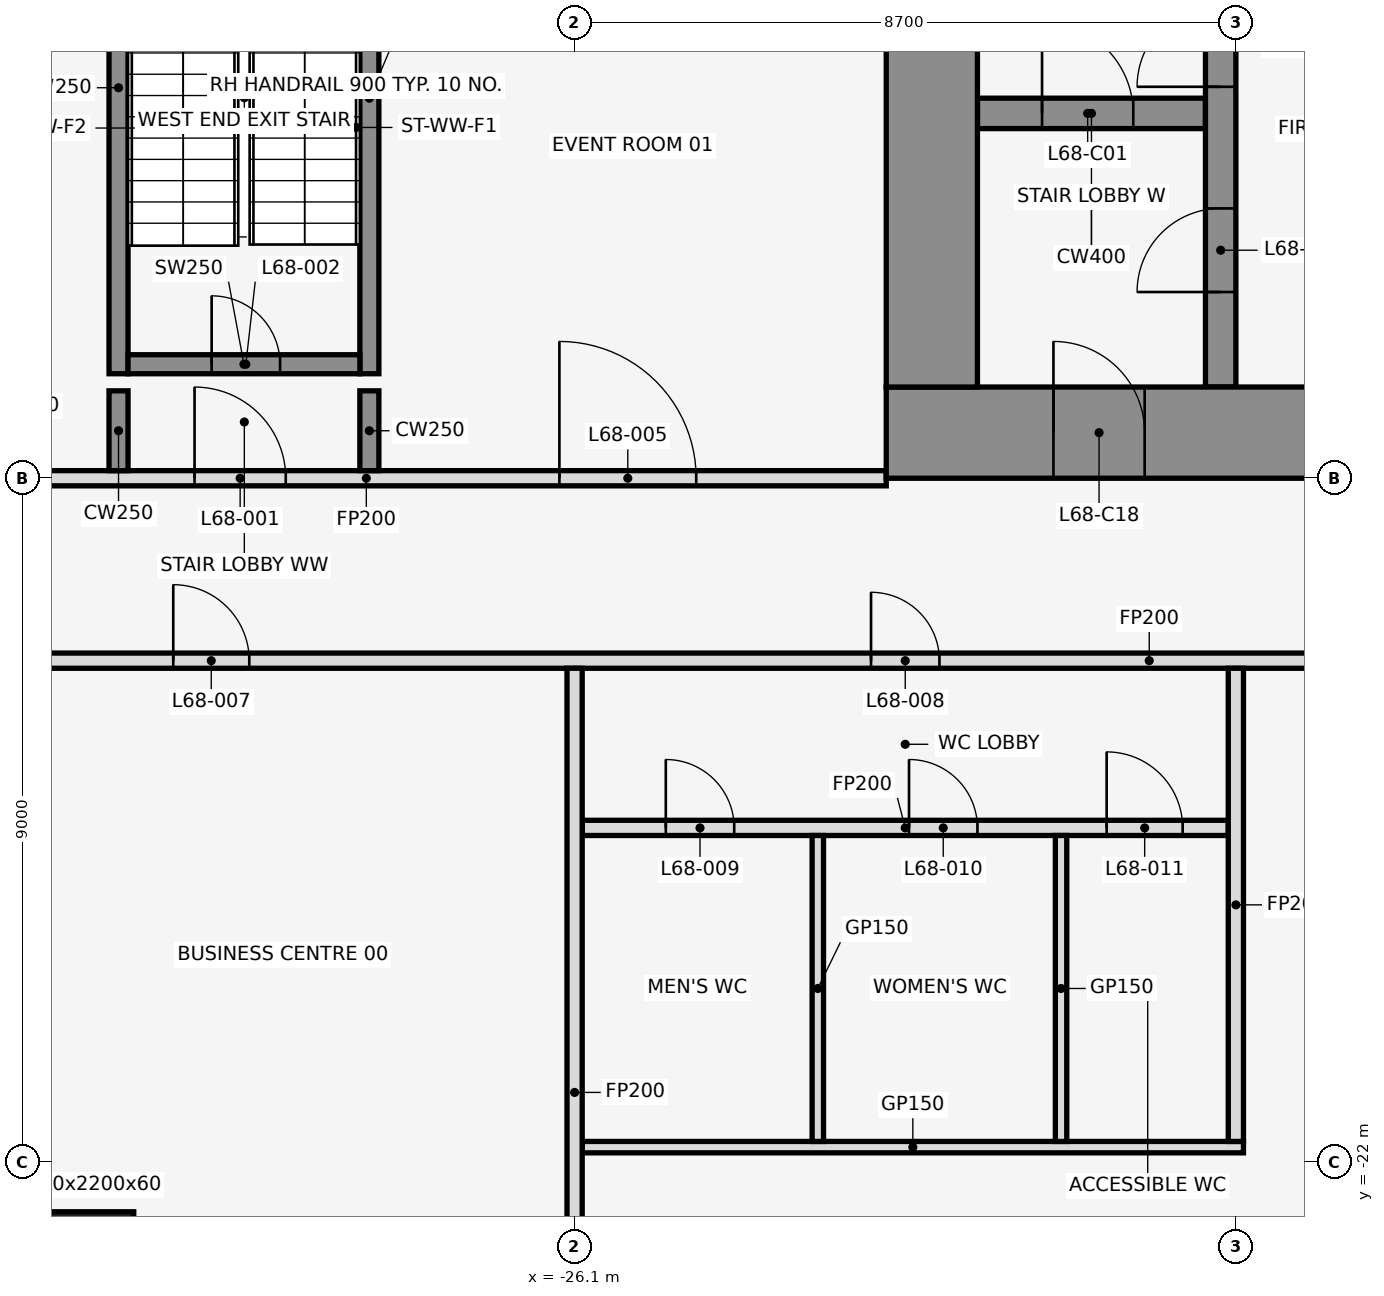
"""IFC4 building model, lengths in metres.
Left out: names, types, materials, properties, quantities, classifications, styles, units other than length and angle.
Written with IfcOpenShell. Run it as: python <this file> out.ifc"""

import sys

from ifc_helpers import new_model, si_unit, direction, frame, frame_2d, origin, origin_2d, place, context, subcontext, project, spatial, rectangle, hollow_rectangle, extrude, element, fill, save


model = new_model("IFC4")
c1 = context("Model", 3, precision=1e-05, world=origin(), true_north=direction((0.0, 1.0)))
c2 = subcontext(c1, "Body", "Model", "MODEL_VIEW")
j1 = project(units=[si_unit("LENGTHUNIT", "METRE"), si_unit("PLANEANGLEUNIT", "RADIAN")], contexts=[c1])
p1 = place(None, origin())
s1 = spatial("IfcSite", under=j1, at=p1, CompositionType="ELEMENT")
p2 = place(p1, origin())
s2 = spatial("IfcBuilding", under=s1, at=p2, CompositionType="ELEMENT")
p3 = place(p2, frame((0.0, 0.0, 302.0)))
s3 = spatial("IfcBuildingStorey", under=s2, at=p3, CompositionType="ELEMENT", Elevation=302.0)
p4 = place(p3, frame((-33.0, -23.75, 0.0), z_axis=(0.0, 0.0, 1.0), x_axis=(1.0, 0.0, 0.0)))
e1 = element("IfcColumn", 1, at=p4, inside=s3, PredefinedType="COLUMN", context=c2, shape_type="SweptSolid", body=[
    extrude(hollow_rectangle(XDim=2.2, YDim=2.2, WallThickness=0.06, at=origin_2d()), origin(), (0.0, 0.0, 1.0), 4.5),
])
p5 = place(p3, frame((-32.1, -11.625, 0.0), z_axis=(0.0, 0.0, 1.0), x_axis=(0.0, 1.0, 0.0)))
e2 = element("IfcWall", 2, at=p5, inside=s3, PredefinedType="SHEAR", context=c2, shape_type="SweptSolid", body=[
    extrude(rectangle(XDim=7.525, YDim=0.25, at=frame_2d((3.762, 0.0))), origin(), (0.0, 0.0, 1.0), 4.5),
])
p6 = place(p3, frame((-28.8, -11.625, 0.0), z_axis=(0.0, 0.0, 1.0), x_axis=(0.0, 1.0, 0.0)))
e3 = element("IfcWall", 3, at=p6, inside=s3, PredefinedType="SHEAR", context=c2, shape_type="SweptSolid", body=[
    extrude(rectangle(XDim=7.25, YDim=0.25, at=frame_2d((3.625, 0.0))), origin(), (0.0, 0.0, 1.0), 4.5),
])
p7 = place(p3, frame((-31.975, -11.5, 0.0), z_axis=(0.0, 0.0, 1.0), x_axis=(1.0, 0.0, 0.0)))
e4 = element("IfcWall", 4, at=p7, inside=s3, PredefinedType="SHEAR", context=c2, shape_type="SweptSolid", body=[
    extrude(rectangle(XDim=3.05, YDim=0.25, at=frame_2d((1.525, 0.0))), origin(), (0.0, 0.0, 1.0), 4.5),
])
p8 = place(p7, frame((1.1, 0.0, 0.0)))
e5 = element("IfcOpeningElement", 5, at=p8, cuts=e4, PredefinedType="OPENING", context=c2, shape_type="SweptSolid", body=[
    extrude(rectangle(XDim=0.9, YDim=2.1, at=frame_2d((0.45, 1.05))), frame((0.0, 0.137, 0.0), z_axis=(0.0, -1.0, 0.0), x_axis=(1.0, 0.0, 0.0)), (0.0, 0.0, 1.0), 0.274),
])
p9 = place(p3, frame((-26.0, -21.8, 0.0), z_axis=(0.0, 0.0, 1.0), x_axis=(1.0, 0.0, 0.0)))
e6 = element("IfcWall", 6, at=p9, inside=s3, PredefinedType="PARTITIONING", context=c2, shape_type="SweptSolid", body=[
    extrude(rectangle(XDim=8.7, YDim=0.15, at=frame_2d((4.35, 0.0))), origin(), (0.0, 0.0, 1.0), 3.418),
])
p10 = place(p3, frame((-26.0, -17.6, 0.0), z_axis=(0.0, 0.0, 1.0), x_axis=(1.0, 0.0, 0.0)))
e7 = element("IfcWall", 7, at=p10, inside=s3, PredefinedType="PARTITIONING", context=c2, shape_type="SweptSolid", body=[
    extrude(rectangle(XDim=8.5, YDim=0.2, at=frame_2d((4.25, 0.0))), origin(), (0.0, 0.0, 1.0), 3.418),
])
p11 = place(p10, frame((1.1, 0.0, 0.0)))
e8 = element("IfcOpeningElement", 8, at=p11, cuts=e7, PredefinedType="OPENING", context=c2, shape_type="SweptSolid", body=[
    extrude(rectangle(XDim=0.9, YDim=2.1, at=frame_2d((0.45, 1.05))), frame((0.0, 0.112, 0.0), z_axis=(0.0, -1.0, 0.0), x_axis=(1.0, 0.0, 0.0)), (0.0, 0.0, 1.0), 0.224),
])
p12 = place(p10, frame((4.3, 0.0, 0.0)))
e9 = element("IfcOpeningElement", 9, at=p12, cuts=e7, PredefinedType="OPENING", context=c2, shape_type="SweptSolid", body=[
    extrude(rectangle(XDim=0.9, YDim=2.1, at=frame_2d((0.45, 1.05))), frame((0.0, 0.112, 0.0), z_axis=(0.0, -1.0, 0.0), x_axis=(1.0, 0.0, 0.0)), (0.0, 0.0, 1.0), 0.224),
])
p13 = place(p10, frame((6.9, 0.0, 0.0)))
e10 = element("IfcOpeningElement", 10, at=p13, cuts=e7, PredefinedType="OPENING", context=c2, shape_type="SweptSolid", body=[
    extrude(rectangle(XDim=1.0, YDim=2.1, at=frame_2d((0.5, 1.05))), frame((0.0, 0.112, 0.0), z_axis=(0.0, -1.0, 0.0), x_axis=(1.0, 0.0, 0.0)), (0.0, 0.0, 1.0), 0.224),
])
p14 = place(p3, frame((-35.68, -15.4, 0.0), z_axis=(0.0, 0.0, 1.0), x_axis=(1.0, 0.0, 0.0)))
e11 = element("IfcWall", 11, at=p14, inside=s3, PredefinedType="PARTITIONING", context=c2, shape_type="SweptSolid", body=[
    extrude(rectangle(XDim=34.28, YDim=0.2, at=frame_2d((17.14, 0.0))), origin(), (0.0, 0.0, 1.0), 3.418),
])
p15 = place(p14, frame((4.3, 0.0, 0.0)))
e12 = element("IfcOpeningElement", 12, at=p15, cuts=e11, PredefinedType="OPENING", context=c2, shape_type="SweptSolid", body=[
    extrude(rectangle(XDim=1.0, YDim=2.1, at=frame_2d((0.5, 1.05))), frame((0.0, 0.112, 0.0), z_axis=(0.0, -1.0, 0.0), x_axis=(1.0, 0.0, 0.0)), (0.0, 0.0, 1.0), 0.224),
])
p16 = place(p14, frame((13.48, 0.0, 0.0)))
e13 = element("IfcOpeningElement", 13, at=p16, cuts=e11, PredefinedType="OPENING", context=c2, shape_type="SweptSolid", body=[
    extrude(rectangle(XDim=0.9, YDim=2.1, at=frame_2d((0.45, 1.05))), frame((0.0, 0.112, 0.0), z_axis=(0.0, -1.0, 0.0), x_axis=(1.0, 0.0, 0.0)), (0.0, 0.0, 1.0), 0.224),
])
p17 = place(p14, frame((21.68, 0.0, 0.0)))
e14 = element("IfcOpeningElement", 14, at=p17, cuts=e11, PredefinedType="OPENING", context=c2, shape_type="SweptSolid", body=[
    extrude(rectangle(XDim=1.8, YDim=2.1, at=frame_2d((0.9, 1.05))), frame((0.0, 0.112, 0.0), z_axis=(0.0, -1.0, 0.0), x_axis=(1.0, 0.0, 0.0)), (0.0, 0.0, 1.0), 0.224),
])
p18 = place(p3, frame((-35.68, -13.0, 0.0), z_axis=(0.0, 0.0, 1.0), x_axis=(1.0, 0.0, 0.0)))
e15 = element("IfcWall", 15, at=p18, inside=s3, PredefinedType="PARTITIONING", context=c2, shape_type="SweptSolid", body=[
    extrude(rectangle(XDim=13.68, YDim=0.2, at=frame_2d((6.84, 0.0))), origin(), (0.0, 0.0, 1.0), 3.418),
])
p19 = place(p18, frame((4.58, 0.0, 0.0)))
e16 = element("IfcOpeningElement", 16, at=p19, cuts=e15, PredefinedType="OPENING", context=c2, shape_type="SweptSolid", body=[
    extrude(rectangle(XDim=1.2, YDim=2.1, at=frame_2d((0.6, 1.05))), frame((0.0, 0.112, 0.0), z_axis=(0.0, -1.0, 0.0), x_axis=(1.0, 0.0, 0.0)), (0.0, 0.0, 1.0), 0.224),
])
p20 = place(p18, frame((9.38, 0.0, 0.0)))
e17 = element("IfcOpeningElement", 17, at=p20, cuts=e15, PredefinedType="OPENING", context=c2, shape_type="SweptSolid", body=[
    extrude(rectangle(XDim=1.8, YDim=2.1, at=frame_2d((0.9, 1.05))), frame((0.0, 0.112, 0.0), z_axis=(0.0, -1.0, 0.0), x_axis=(1.0, 0.0, 0.0)), (0.0, 0.0, 1.0), 0.224),
])
for number, where, z_axis, x_axis in (
    (18, (-32.1, -12.9, 0.0), (0.0, 0.0, 1.0), (0.0, 1.0, 0.0)),
    (19, (-28.8, -12.9, 0.0), (0.0, 0.0, 1.0), (0.0, 1.0, 0.0)),
):
    element("IfcWall", number, at=place(p3, frame(where, z_axis=z_axis, x_axis=x_axis)), inside=s3, PredefinedType="SHEAR", context=c2, shape_type="SweptSolid", body=[
        extrude(rectangle(XDim=1.05, YDim=0.25, at=frame_2d((0.525, 0.0))), origin(), (0.0, 0.0, 1.0), 4.5),
    ])
p21 = place(p3, frame((-26.1, -26.66, 0.0), z_axis=(0.0, 0.0, 1.0), x_axis=(0.0, 1.0, 0.0)))
e20 = element("IfcWall", 20, at=p21, inside=s3, PredefinedType="PARTITIONING", context=c2, shape_type="SweptSolid", body=[
    extrude(rectangle(XDim=11.16, YDim=0.2, at=frame_2d((5.58, 0.0))), origin(), (0.0, 0.0, 1.0), 3.418),
])
for number, where, z_axis, x_axis in (
    (21, (-22.9, -21.725, 0.0), (0.0, 0.0, 1.0), (0.0, 1.0, 0.0)),
    (22, (-19.7, -21.725, 0.0), (0.0, 0.0, 1.0), (0.0, 1.0, 0.0)),
):
    element("IfcWall", number, at=place(p3, frame(where, z_axis=z_axis, x_axis=x_axis)), inside=s3, PredefinedType="PARTITIONING", context=c2, shape_type="SweptSolid", body=[
        extrude(rectangle(XDim=4.025, YDim=0.15, at=frame_2d((2.013, 0.0))), origin(), (0.0, 0.0, 1.0), 3.418),
    ])
p22 = place(p3, frame((-17.4, -21.725, 0.0), z_axis=(0.0, 0.0, 1.0), x_axis=(0.0, 1.0, 0.0)))
e23 = element("IfcWall", 23, at=p22, inside=s3, PredefinedType="PARTITIONING", context=c2, shape_type="SweptSolid", body=[
    extrude(rectangle(XDim=6.225, YDim=0.2, at=frame_2d((3.113, 0.0))), origin(), (0.0, 0.0, 1.0), 3.418),
])
p23 = place(p3, frame((-20.8, -8.2, 0.0), z_axis=(0.0, 0.0, 1.0), x_axis=(1.0, 0.0, 0.0)))
e24 = element("IfcWall", 24, at=p23, inside=s3, PredefinedType="SHEAR", context=c2, shape_type="SweptSolid", body=[
    extrude(rectangle(XDim=3.0, YDim=0.4, at=frame_2d((1.5, 0.0))), origin(), (0.0, 0.0, 1.0), 4.5),
])
p24 = place(p23, frame((0.85, 0.0, 0.0)))
e25 = element("IfcOpeningElement", 25, at=p24, cuts=e24, PredefinedType="OPENING", context=c2, shape_type="SweptSolid", body=[
    extrude(rectangle(XDim=1.2, YDim=2.1, at=frame_2d((0.6, 1.05))), frame((0.0, 0.212, 0.0), z_axis=(0.0, -1.0, 0.0), x_axis=(1.0, 0.0, 0.0)), (0.0, 0.0, 1.0), 0.424),
])
p25 = place(p3, frame((-17.6, -11.8, 0.0), z_axis=(0.0, 0.0, 1.0), x_axis=(0.0, 1.0, 0.0)))
e26 = element("IfcWall", 26, at=p25, inside=s3, PredefinedType="SHEAR", context=c2, shape_type="SweptSolid", body=[
    extrude(rectangle(XDim=10.6, YDim=0.4, at=frame_2d((5.3, 0.0))), origin(), (0.0, 0.0, 1.0), 4.5),
])
p26 = place(p25, frame((1.25, 0.0, 0.0)))
e27 = element("IfcOpeningElement", 27, at=p26, cuts=e26, PredefinedType="OPENING", context=c2, shape_type="SweptSolid", body=[
    extrude(rectangle(XDim=1.1, YDim=2.1, at=frame_2d((0.55, 1.05))), frame((0.0, 0.212, 0.0), z_axis=(0.0, -1.0, 0.0), x_axis=(1.0, 0.0, 0.0)), (0.0, 0.0, 1.0), 0.424),
])
p27 = place(p25, frame((3.95, 0.0, 0.0)))
e28 = element("IfcOpeningElement", 28, at=p27, cuts=e26, PredefinedType="OPENING", context=c2, shape_type="SweptSolid", body=[
    extrude(rectangle(XDim=1.1, YDim=2.1, at=frame_2d((0.55, 1.05))), frame((0.0, 0.212, 0.0), z_axis=(0.0, -1.0, 0.0), x_axis=(1.0, 0.0, 0.0)), (0.0, 0.0, 1.0), 0.424),
])
p28 = place(p3, frame((-22.0, -12.4, 0.0), z_axis=(0.0, 0.0, 1.0), x_axis=(1.0, 0.0, 0.0)))
e29 = element("IfcWall", 29, at=p28, inside=s3, PredefinedType="SHEAR", context=c2, shape_type="SweptSolid", body=[
    extrude(rectangle(XDim=44.0, YDim=1.2, at=frame_2d((22.0, 0.0))), origin(), (0.0, 0.0, 1.0), 4.5),
])
p29 = place(p28, frame((2.2, 0.0, 0.0)))
e30 = element("IfcOpeningElement", 30, at=p29, cuts=e29, PredefinedType="OPENING", context=c2, shape_type="SweptSolid", body=[
    extrude(rectangle(XDim=1.2, YDim=2.1, at=frame_2d((0.6, 1.05))), frame((0.0, 0.612, 0.0), z_axis=(0.0, -1.0, 0.0), x_axis=(1.0, 0.0, 0.0)), (0.0, 0.0, 1.0), 1.224),
])
p30 = place(p28, frame((21.4, 0.0, 0.0)))
e31 = element("IfcOpeningElement", 31, at=p30, cuts=e29, PredefinedType="OPENING", context=c2, shape_type="SweptSolid", body=[
    extrude(rectangle(XDim=1.2, YDim=2.1, at=frame_2d((0.6, 1.05))), frame((0.0, 0.612, 0.0), z_axis=(0.0, -1.0, 0.0), x_axis=(1.0, 0.0, 0.0)), (0.0, 0.0, 1.0), 1.224),
])
p31 = place(p28, frame((40.6, 0.0, 0.0)))
e32 = element("IfcOpeningElement", 32, at=p31, cuts=e29, PredefinedType="OPENING", context=c2, shape_type="SweptSolid", body=[
    extrude(rectangle(XDim=1.2, YDim=2.1, at=frame_2d((0.6, 1.05))), frame((0.0, 0.612, 0.0), z_axis=(0.0, -1.0, 0.0), x_axis=(1.0, 0.0, 0.0)), (0.0, 0.0, 1.0), 1.224),
])
p32 = place(p28, frame((16.0, 0.0, 0.0)))
e33 = element("IfcOpeningElement", 33, at=p32, cuts=e29, PredefinedType="OPENING", context=c2, shape_type="SweptSolid", body=[
    extrude(rectangle(XDim=1.8, YDim=2.1, at=frame_2d((0.9, 1.05))), frame((0.0, 0.612, 0.0), z_axis=(0.0, -1.0, 0.0), x_axis=(1.0, 0.0, 0.0)), (0.0, 0.0, 1.0), 1.224),
])
p33 = place(p28, frame((6.3, 0.0, 0.0)))
e34 = element("IfcOpeningElement", 34, at=p33, cuts=e29, PredefinedType="OPENING", context=c2, shape_type="SweptSolid", body=[
    extrude(rectangle(XDim=1.2, YDim=2.1, at=frame_2d((0.6, 1.05))), frame((0.0, 0.612, 0.0), z_axis=(0.0, -1.0, 0.0), x_axis=(1.0, 0.0, 0.0)), (0.0, 0.0, 1.0), 1.224),
])
p34 = place(p28, frame((26.2, 0.0, 0.0)))
e35 = element("IfcOpeningElement", 35, at=p34, cuts=e29, PredefinedType="OPENING", context=c2, shape_type="SweptSolid", body=[
    extrude(rectangle(XDim=1.8, YDim=2.1, at=frame_2d((0.9, 1.05))), frame((0.0, 0.612, 0.0), z_axis=(0.0, -1.0, 0.0), x_axis=(1.0, 0.0, 0.0)), (0.0, 0.0, 1.0), 1.224),
])
p35 = place(p28, frame((36.5, 0.0, 0.0)))
e36 = element("IfcOpeningElement", 36, at=p35, cuts=e29, PredefinedType="OPENING", context=c2, shape_type="SweptSolid", body=[
    extrude(rectangle(XDim=1.2, YDim=2.1, at=frame_2d((0.6, 1.05))), frame((0.0, 0.612, 0.0), z_axis=(0.0, -1.0, 0.0), x_axis=(1.0, 0.0, 0.0)), (0.0, 0.0, 1.0), 1.224),
])
p36 = place(p3, frame((-21.4, -11.8, 0.0), z_axis=(0.0, 0.0, 1.0), x_axis=(0.0, 1.0, 0.0)))
e37 = element("IfcWall", 37, at=p36, inside=s3, PredefinedType="SHEAR", context=c2, shape_type="SweptSolid", body=[
    extrude(rectangle(XDim=10.6, YDim=1.2, at=frame_2d((5.3, 0.0))), origin(), (0.0, 0.0, 1.0), 4.5),
])
p37 = place(p19, origin())
e38 = element("IfcDoor", 38, at=p37, inside=s3, OperationType="SINGLE_SWING_LEFT", PredefinedType="DOOR", context=c2, shape_type="SweptSolid", body=[
    extrude(rectangle(XDim=1.2, YDim=2.1, at=frame_2d((0.6, 1.05))), frame((0.0, 0.025, 0.0), z_axis=(0.0, -1.0, 0.0), x_axis=(1.0, 0.0, 0.0)), (0.0, 0.0, 1.0), 0.05),
])
fill(e16, e38)
p38 = place(p8, origin())
e39 = element("IfcDoor", 39, at=p38, inside=s3, OperationType="SINGLE_SWING_LEFT", PredefinedType="DOOR", context=c2, shape_type="SweptSolid", body=[
    extrude(rectangle(XDim=0.9, YDim=2.1, at=frame_2d((0.45, 1.05))), frame((0.0, 0.025, 0.0), z_axis=(0.0, -1.0, 0.0), x_axis=(1.0, 0.0, 0.0)), (0.0, 0.0, 1.0), 0.05),
])
fill(e5, e39)
p39 = place(p20, origin())
e40 = element("IfcDoor", 40, at=p39, inside=s3, OperationType="SINGLE_SWING_LEFT", PredefinedType="DOOR", context=c2, shape_type="SweptSolid", body=[
    extrude(rectangle(XDim=1.8, YDim=2.1, at=frame_2d((0.9, 1.05))), frame((0.0, 0.025, 0.0), z_axis=(0.0, -1.0, 0.0), x_axis=(1.0, 0.0, 0.0)), (0.0, 0.0, 1.0), 0.05),
])
fill(e17, e40)
p40 = place(p15, frame((1.0, 0.0, 0.0), z_axis=(0.0, 0.0, 1.0), x_axis=(-1.0, 0.0, 0.0)))
e41 = element("IfcDoor", 41, at=p40, inside=s3, OperationType="SINGLE_SWING_LEFT", PredefinedType="DOOR", context=c2, shape_type="SweptSolid", body=[
    extrude(rectangle(XDim=1.0, YDim=2.1, at=frame_2d((0.5, 1.05))), frame((0.0, 0.025, 0.0), z_axis=(0.0, -1.0, 0.0), x_axis=(1.0, 0.0, 0.0)), (0.0, 0.0, 1.0), 0.05),
])
fill(e12, e41)
p41 = place(p16, frame((0.9, 0.0, 0.0), z_axis=(0.0, 0.0, 1.0), x_axis=(-1.0, 0.0, 0.0)))
e42 = element("IfcDoor", 42, at=p41, inside=s3, OperationType="SINGLE_SWING_RIGHT", PredefinedType="DOOR", context=c2, shape_type="SweptSolid", body=[
    extrude(rectangle(XDim=0.9, YDim=2.1, at=frame_2d((0.45, 1.05))), frame((0.0, 0.025, 0.0), z_axis=(0.0, -1.0, 0.0), x_axis=(1.0, 0.0, 0.0)), (0.0, 0.0, 1.0), 0.05),
])
fill(e13, e42)
p42 = place(p11, frame((0.9, 0.0, 0.0), z_axis=(0.0, 0.0, 1.0), x_axis=(-1.0, 0.0, 0.0)))
e43 = element("IfcDoor", 43, at=p42, inside=s3, OperationType="SINGLE_SWING_RIGHT", PredefinedType="DOOR", context=c2, shape_type="SweptSolid", body=[
    extrude(rectangle(XDim=0.9, YDim=2.1, at=frame_2d((0.45, 1.05))), frame((0.0, 0.025, 0.0), z_axis=(0.0, -1.0, 0.0), x_axis=(1.0, 0.0, 0.0)), (0.0, 0.0, 1.0), 0.05),
])
fill(e8, e43)
p43 = place(p12, frame((0.9, 0.0, 0.0), z_axis=(0.0, 0.0, 1.0), x_axis=(-1.0, 0.0, 0.0)))
e44 = element("IfcDoor", 44, at=p43, inside=s3, OperationType="SINGLE_SWING_LEFT", PredefinedType="DOOR", context=c2, shape_type="SweptSolid", body=[
    extrude(rectangle(XDim=0.9, YDim=2.1, at=frame_2d((0.45, 1.05))), frame((0.0, 0.025, 0.0), z_axis=(0.0, -1.0, 0.0), x_axis=(1.0, 0.0, 0.0)), (0.0, 0.0, 1.0), 0.05),
])
fill(e9, e44)
p44 = place(p13, frame((1.0, 0.0, 0.0), z_axis=(0.0, 0.0, 1.0), x_axis=(-1.0, 0.0, 0.0)))
e45 = element("IfcDoor", 45, at=p44, inside=s3, OperationType="SINGLE_SWING_RIGHT", PredefinedType="DOOR", context=c2, shape_type="SweptSolid", body=[
    extrude(rectangle(XDim=1.0, YDim=2.1, at=frame_2d((0.5, 1.05))), frame((0.0, 0.025, 0.0), z_axis=(0.0, -1.0, 0.0), x_axis=(1.0, 0.0, 0.0)), (0.0, 0.0, 1.0), 0.05),
])
fill(e10, e45)
p45 = place(p24, origin())
e46 = element("IfcDoor", 46, at=p45, inside=s3, OperationType="SINGLE_SWING_LEFT", PredefinedType="DOOR", context=c2, shape_type="SweptSolid", body=[
    extrude(rectangle(XDim=1.2, YDim=2.1, at=frame_2d((0.6, 1.05))), frame((0.0, 0.025, 0.0), z_axis=(0.0, -1.0, 0.0), x_axis=(1.0, 0.0, 0.0)), (0.0, 0.0, 1.0), 0.05),
])
fill(e25, e46)
p46 = place(p26, frame((1.1, 0.0, 0.0), z_axis=(0.0, 0.0, 1.0), x_axis=(-1.0, 0.0, 0.0)))
e47 = element("IfcDoor", 47, at=p46, inside=s3, OperationType="SINGLE_SWING_LEFT", PredefinedType="DOOR", context=c2, shape_type="SweptSolid", body=[
    extrude(rectangle(XDim=1.1, YDim=2.1, at=frame_2d((0.55, 1.05))), frame((0.0, 0.025, 0.0), z_axis=(0.0, -1.0, 0.0), x_axis=(1.0, 0.0, 0.0)), (0.0, 0.0, 1.0), 0.05),
])
fill(e27, e47)
p47 = place(p27, frame((1.1, 0.0, 0.0), z_axis=(0.0, 0.0, 1.0), x_axis=(-1.0, 0.0, 0.0)))
e48 = element("IfcDoor", 48, at=p47, inside=s3, OperationType="SINGLE_SWING_LEFT", PredefinedType="DOOR", context=c2, shape_type="SweptSolid", body=[
    extrude(rectangle(XDim=1.1, YDim=2.1, at=frame_2d((0.55, 1.05))), frame((0.0, 0.025, 0.0), z_axis=(0.0, -1.0, 0.0), x_axis=(1.0, 0.0, 0.0)), (0.0, 0.0, 1.0), 0.05),
])
fill(e28, e48)
p48 = place(p29, frame((1.2, 0.0, 0.0), z_axis=(0.0, 0.0, 1.0), x_axis=(-1.0, 0.0, 0.0)))
e49 = element("IfcDoor", 49, at=p48, inside=s3, OperationType="SINGLE_SWING_RIGHT", PredefinedType="DOOR", context=c2, shape_type="SweptSolid", body=[
    extrude(rectangle(XDim=1.2, YDim=2.1, at=frame_2d((0.6, 1.05))), frame((0.0, 0.025, 0.0), z_axis=(0.0, -1.0, 0.0), x_axis=(1.0, 0.0, 0.0)), (0.0, 0.0, 1.0), 0.05),
])
fill(e30, e49)
save(model, sys.argv[1])
